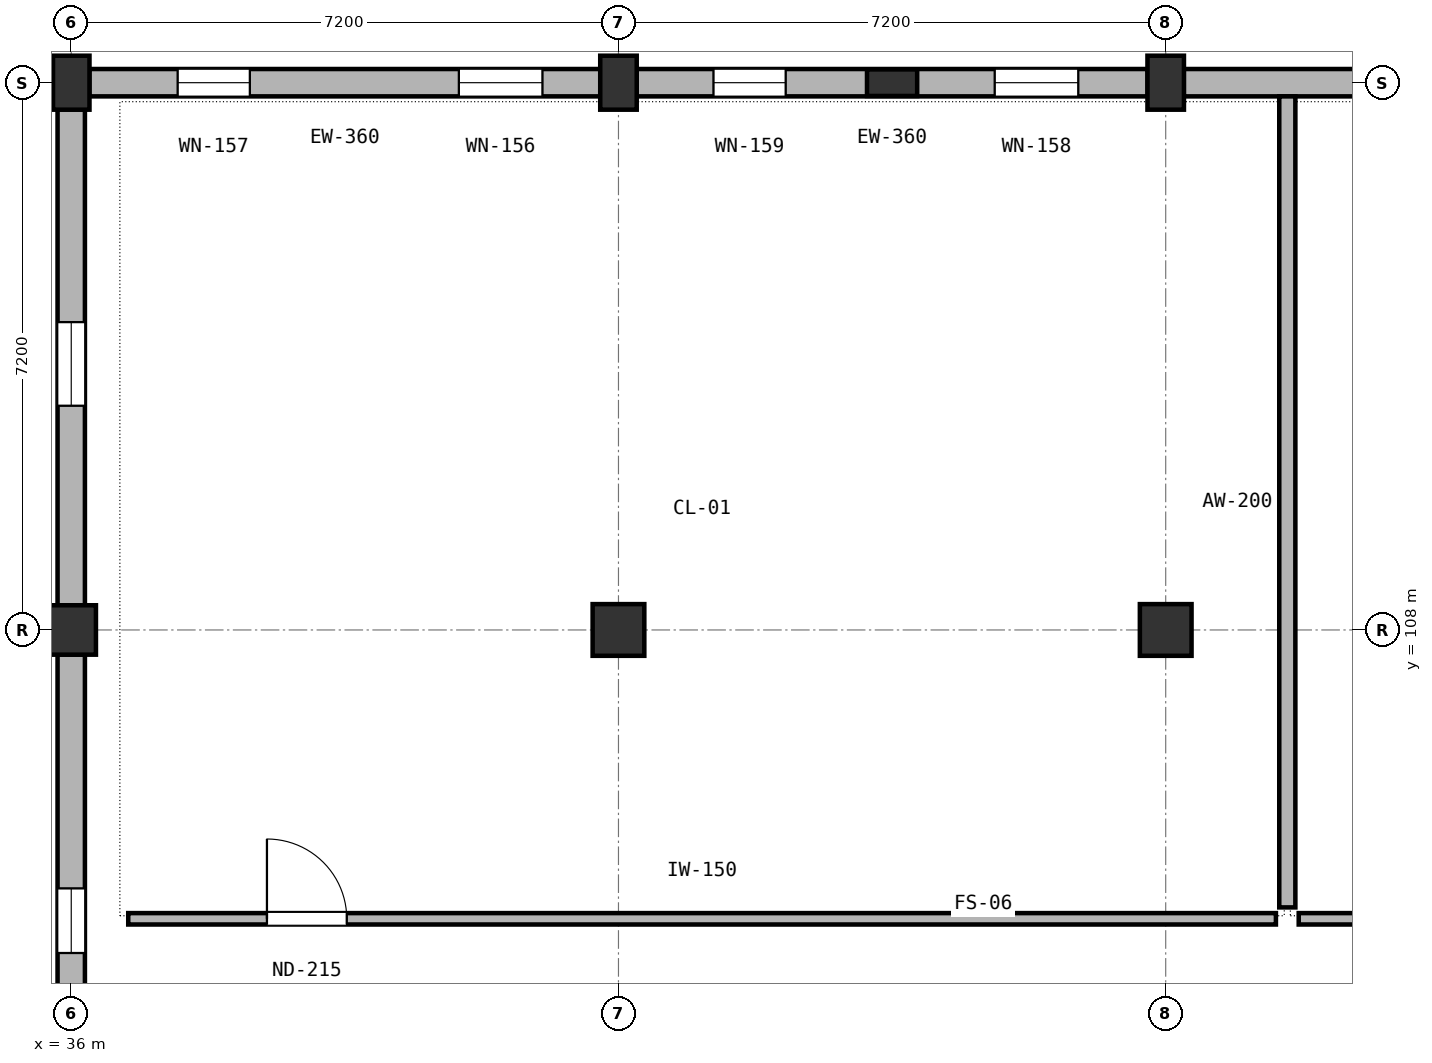
"""IFC4 building model, lengths in metres.
Left out: names, types, materials, properties, quantities, classifications, styles, units other than length and angle.
Written with IfcOpenShell. Run it as: python <this file> out.ifc"""

import sys

from ifc_helpers import new_model, si_unit, direction, frame, frame_2d, origin, origin_2d, place, context, subcontext, project, spatial, rectangle, extrude, element, fill, save


model = new_model("IFC4")
c1 = context("Model", 3, precision=1e-05, world=origin(), true_north=direction((0.0, 1.0)))
c2 = subcontext(c1, "Body", "Model", "MODEL_VIEW")
j1 = project(units=[si_unit("LENGTHUNIT", "METRE"), si_unit("PLANEANGLEUNIT", "RADIAN")], contexts=[c1])
p1 = place(None, origin())
s1 = spatial("IfcSite", under=j1, at=p1, CompositionType="ELEMENT")
p2 = place(p1, origin())
s2 = spatial("IfcBuilding", under=s1, at=p2, CompositionType="ELEMENT")
p3 = place(p2, frame((0.0, 0.0, 22.5)))
s3 = spatial("IfcBuildingStorey", under=s2, at=p3, CompositionType="ELEMENT", Elevation=22.5)
p4 = place(p3, frame((36.0, 108.0, 0.0), z_axis=(0.0, 0.0, 1.0), x_axis=(1.0, 0.0, 0.0)))
e1 = element("IfcColumn", 1, at=p4, inside=s3, PredefinedType="COLUMN", context=c2, shape_type="SweptSolid", body=[
    extrude(rectangle(XDim=0.65, YDim=0.65, at=origin_2d()), origin(), (0.0, 0.0, 1.0), 3.9),
])
p5 = place(p3, frame((36.0, 115.2, 0.0), z_axis=(0.0, 0.0, 1.0), x_axis=(1.0, 0.0, 0.0)))
e2 = element("IfcColumn", 2, at=p5, inside=s3, PredefinedType="COLUMN", context=c2, shape_type="SweptSolid", body=[
    extrude(rectangle(XDim=0.48, YDim=0.71, at=origin_2d()), origin(), (0.0, 0.0, 1.0), 3.9),
])
p6 = place(p3, frame((43.2, 108.0, 0.0), z_axis=(0.0, 0.0, 1.0), x_axis=(1.0, 0.0, 0.0)))
e3 = element("IfcColumn", 3, at=p6, inside=s3, PredefinedType="COLUMN", context=c2, shape_type="SweptSolid", body=[
    extrude(rectangle(XDim=0.68, YDim=0.68, at=origin_2d()), origin(), (0.0, 0.0, 1.0), 3.9),
])
p7 = place(p3, frame((43.2, 115.2, 0.0), z_axis=(0.0, 0.0, 1.0), x_axis=(1.0, 0.0, 0.0)))
e4 = element("IfcColumn", 4, at=p7, inside=s3, PredefinedType="COLUMN", context=c2, shape_type="SweptSolid", body=[
    extrude(rectangle(XDim=0.48, YDim=0.71, at=origin_2d()), origin(), (0.0, 0.0, 1.0), 3.9),
])
p8 = place(p3, frame((50.4, 108.0, 0.0), z_axis=(0.0, 0.0, 1.0), x_axis=(1.0, 0.0, 0.0)))
e5 = element("IfcColumn", 5, at=p8, inside=s3, PredefinedType="COLUMN", context=c2, shape_type="SweptSolid", body=[
    extrude(rectangle(XDim=0.68, YDim=0.68, at=origin_2d()), origin(), (0.0, 0.0, 1.0), 3.9),
])
p9 = place(p3, frame((50.4, 115.2, 0.0), z_axis=(0.0, 0.0, 1.0), x_axis=(1.0, 0.0, 0.0)))
e6 = element("IfcColumn", 6, at=p9, inside=s3, PredefinedType="COLUMN", context=c2, shape_type="SweptSolid", body=[
    extrude(rectangle(XDim=0.48, YDim=0.71, at=origin_2d()), origin(), (0.0, 0.0, 1.0), 3.9),
])
p10 = place(p3, frame((46.8, 115.2, 0.0), z_axis=(0.0, 0.0, 1.0), x_axis=(1.0, 0.0, 0.0)))
e7 = element("IfcColumn", 7, at=p10, inside=s3, PredefinedType="PILASTER", context=c2, shape_type="SweptSolid", body=[
    extrude(rectangle(XDim=0.66, YDim=0.35, at=origin_2d()), origin(), (0.0, 0.0, 1.0), 3.9),
])
p11 = place(p3, frame((42.962, 115.2, 0.0), z_axis=(0.0, 0.0, 1.0), x_axis=(-1.0, 0.0, 0.0)))
e8 = element("IfcWall", 8, at=p11, inside=s3, PredefinedType="SOLIDWALL", context=c2, shape_type="SweptSolid", body=[
    extrude(rectangle(XDim=6.724, YDim=0.36, at=frame_2d((3.362, 0.0))), origin(), (0.0, 0.0, 1.0), 2.74),
])
p12 = place(p11, frame((0.762, 0.0, 0.7)))
e9 = element("IfcOpeningElement", 9, at=p12, cuts=e8, PredefinedType="OPENING", context=c2, shape_type="SweptSolid", body=[
    extrude(rectangle(XDim=1.1, YDim=1.84, at=frame_2d((0.55, 0.92))), frame((0.0, 0.19, 0.0), z_axis=(0.0, -1.0, 0.0), x_axis=(1.0, 0.0, 0.0)), (0.0, 0.0, 1.0), 0.38),
])
p13 = place(p11, frame((4.612, 0.0, 0.7)))
e10 = element("IfcOpeningElement", 10, at=p13, cuts=e8, PredefinedType="OPENING", context=c2, shape_type="SweptSolid", body=[
    extrude(rectangle(XDim=0.95, YDim=1.84, at=frame_2d((0.475, 0.92))), frame((0.0, 0.19, 0.0), z_axis=(0.0, -1.0, 0.0), x_axis=(1.0, 0.0, 0.0)), (0.0, 0.0, 1.0), 0.38),
])
p14 = place(p3, frame((50.162, 115.2, 0.0), z_axis=(0.0, 0.0, 1.0), x_axis=(-1.0, 0.0, 0.0)))
e11 = element("IfcWall", 11, at=p14, inside=s3, PredefinedType="SOLIDWALL", context=c2, shape_type="SweptSolid", body=[
    extrude(rectangle(XDim=6.724, YDim=0.36, at=frame_2d((3.362, 0.0))), origin(), (0.0, 0.0, 1.0), 2.74),
])
p15 = place(p14, frame((0.912, 0.0, 0.7)))
e12 = element("IfcOpeningElement", 12, at=p15, cuts=e11, PredefinedType="OPENING", context=c2, shape_type="SweptSolid", body=[
    extrude(rectangle(XDim=1.1, YDim=1.84, at=frame_2d((0.55, 0.92))), frame((0.0, 0.19, 0.0), z_axis=(0.0, -1.0, 0.0), x_axis=(1.0, 0.0, 0.0)), (0.0, 0.0, 1.0), 0.38),
])
p16 = place(p14, frame((4.762, 0.0, 0.7)))
e13 = element("IfcOpeningElement", 13, at=p16, cuts=e11, PredefinedType="OPENING", context=c2, shape_type="SweptSolid", body=[
    extrude(rectangle(XDim=0.95, YDim=1.84, at=frame_2d((0.475, 0.92))), frame((0.0, 0.19, 0.0), z_axis=(0.0, -1.0, 0.0), x_axis=(1.0, 0.0, 0.0)), (0.0, 0.0, 1.0), 0.38),
])
p17 = place(p3, frame((57.362, 115.2, 0.0), z_axis=(0.0, 0.0, 1.0), x_axis=(-1.0, 0.0, 0.0)))
e14 = element("IfcWall", 14, at=p17, inside=s3, PredefinedType="SOLIDWALL", context=c2, shape_type="SweptSolid", body=[
    extrude(rectangle(XDim=6.724, YDim=0.36, at=frame_2d((3.362, 0.0))), origin(), (0.0, 0.0, 1.0), 2.74),
])
p18 = place(p17, frame((0.762, 0.0, 0.7)))
e15 = element("IfcOpeningElement", 15, at=p18, cuts=e14, PredefinedType="OPENING", context=c2, shape_type="SweptSolid", body=[
    extrude(rectangle(XDim=1.1, YDim=1.84, at=frame_2d((0.55, 0.92))), frame((0.0, 0.19, 0.0), z_axis=(0.0, -1.0, 0.0), x_axis=(1.0, 0.0, 0.0)), (0.0, 0.0, 1.0), 0.38),
])
p19 = place(p17, frame((3.179, 0.0, 0.7)))
e16 = element("IfcOpeningElement", 16, at=p19, cuts=e14, PredefinedType="OPENING", context=c2, shape_type="SweptSolid", body=[
    extrude(rectangle(XDim=0.95, YDim=1.84, at=frame_2d((0.475, 0.92))), frame((0.0, 0.19, 0.0), z_axis=(0.0, -1.0, 0.0), x_axis=(1.0, 0.0, 0.0)), (0.0, 0.0, 1.0), 0.38),
])
p20 = place(p3, frame((36.0, 101.123, 0.0), z_axis=(0.0, 0.0, 1.0), x_axis=(0.0, 1.0, 0.0)))
e17 = element("IfcWall", 17, at=p20, inside=s3, PredefinedType="SOLIDWALL", context=c2, shape_type="SweptSolid", body=[
    extrude(rectangle(XDim=6.554, YDim=0.36, at=frame_2d((3.277, 0.0))), origin(), (0.0, 0.0, 1.0), 2.74),
])
p21 = place(p20, frame((2.627, 0.0, 0.7)))
e18 = element("IfcOpeningElement", 18, at=p21, cuts=e17, PredefinedType="OPENING", context=c2, shape_type="SweptSolid", body=[
    extrude(rectangle(XDim=0.85, YDim=1.89, at=frame_2d((0.425, 0.945))), frame((0.0, 0.19, 0.0), z_axis=(0.0, -1.0, 0.0), x_axis=(1.0, 0.0, 0.0)), (0.0, 0.0, 1.0), 0.38),
])
p22 = place(p3, frame((36.0, 108.323, 0.0), z_axis=(0.0, 0.0, 1.0), x_axis=(0.0, 1.0, 0.0)))
e19 = element("IfcWall", 19, at=p22, inside=s3, PredefinedType="SOLIDWALL", context=c2, shape_type="SweptSolid", body=[
    extrude(rectangle(XDim=6.524, YDim=0.36, at=frame_2d((3.262, 0.0))), origin(), (0.0, 0.0, 1.0), 2.74),
])
p23 = place(p22, frame((2.627, 0.0, 0.7)))
e20 = element("IfcOpeningElement", 20, at=p23, cuts=e19, PredefinedType="OPENING", context=c2, shape_type="SweptSolid", body=[
    extrude(rectangle(XDim=1.1, YDim=1.89, at=frame_2d((0.55, 0.945))), frame((0.0, 0.19, 0.0), z_axis=(0.0, -1.0, 0.0), x_axis=(1.0, 0.0, 0.0)), (0.0, 0.0, 1.0), 0.38),
])
p24 = place(p3, frame((36.75, 104.2, 0.0), z_axis=(0.0, 0.0, 1.0), x_axis=(1.0, 0.0, 0.0)))
e21 = element("IfcWall", 21, at=p24, inside=s3, PredefinedType="PARTITIONING", context=c2, shape_type="SweptSolid", body=[
    extrude(rectangle(XDim=15.1, YDim=0.15, at=frame_2d((7.55, 0.0))), origin(), (0.0, 0.0, 1.0), 2.78),
])
p25 = place(p24, frame((1.825, 0.0, 0.0)))
e22 = element("IfcOpeningElement", 22, at=p25, cuts=e21, PredefinedType="OPENING", context=c2, shape_type="SweptSolid", body=[
    extrude(rectangle(XDim=1.05, YDim=2.15, at=frame_2d((0.525, 1.075))), frame((0.0, 0.085, 0.0), z_axis=(0.0, -1.0, 0.0), x_axis=(1.0, 0.0, 0.0)), (0.0, 0.0, 1.0), 0.17),
])
p26 = place(p3, frame((52.15, 104.2, 0.0), z_axis=(0.0, 0.0, 1.0), x_axis=(1.0, 0.0, 0.0)))
e23 = element("IfcWall", 23, at=p26, inside=s3, PredefinedType="PARTITIONING", context=c2, shape_type="SweptSolid", body=[
    extrude(rectangle(XDim=14.5, YDim=0.15, at=frame_2d((7.25, 0.0))), origin(), (0.0, 0.0, 1.0), 2.78),
])
p27 = place(p26, frame((6.55, 0.0, 0.0)))
e24 = element("IfcOpeningElement", 24, at=p27, cuts=e23, PredefinedType="OPENING", context=c2, shape_type="SweptSolid", body=[
    extrude(rectangle(XDim=1.4, YDim=2.2, at=frame_2d((0.7, 1.1))), frame((0.0, 0.085, 0.0), z_axis=(0.0, -1.0, 0.0), x_axis=(1.0, 0.0, 0.0)), (0.0, 0.0, 1.0), 0.17),
])
p28 = place(p3, frame((52.0, 104.35, 0.0), z_axis=(0.0, 0.0, 1.0), x_axis=(0.0, 1.0, 0.0)))
e25 = element("IfcWall", 25, at=p28, inside=s3, PredefinedType="PARTITIONING", context=c2, shape_type="SweptSolid", body=[
    extrude(rectangle(XDim=10.67, YDim=0.212, at=frame_2d((5.335, 0.0))), origin(), (0.0, 0.0, 1.0), 2.78),
])
p29 = place(p12, origin())
e26 = element("IfcWindow", 26, at=p29, inside=s3, PartitioningType="SINGLE_PANEL", PredefinedType="WINDOW", context=c2, shape_type="SweptSolid", body=[
    extrude(rectangle(XDim=1.1, YDim=1.84, at=frame_2d((0.55, 0.92))), frame((0.0, 0.03, 0.0), z_axis=(0.0, -1.0, 0.0), x_axis=(1.0, 0.0, 0.0)), (0.0, 0.0, 1.0), 0.06),
])
fill(e9, e26)
p30 = place(p13, origin())
e27 = element("IfcWindow", 27, at=p30, inside=s3, PartitioningType="SINGLE_PANEL", PredefinedType="WINDOW", context=c2, shape_type="SweptSolid", body=[
    extrude(rectangle(XDim=0.95, YDim=1.84, at=frame_2d((0.475, 0.92))), frame((0.0, 0.03, 0.0), z_axis=(0.0, -1.0, 0.0), x_axis=(1.0, 0.0, 0.0)), (0.0, 0.0, 1.0), 0.06),
])
fill(e10, e27)
p31 = place(p15, origin())
e28 = element("IfcWindow", 28, at=p31, inside=s3, PartitioningType="SINGLE_PANEL", PredefinedType="WINDOW", context=c2, shape_type="SweptSolid", body=[
    extrude(rectangle(XDim=1.1, YDim=1.84, at=frame_2d((0.55, 0.92))), frame((0.0, 0.03, 0.0), z_axis=(0.0, -1.0, 0.0), x_axis=(1.0, 0.0, 0.0)), (0.0, 0.0, 1.0), 0.06),
])
fill(e12, e28)
p32 = place(p16, origin())
e29 = element("IfcWindow", 29, at=p32, inside=s3, PartitioningType="SINGLE_PANEL", PredefinedType="WINDOW", context=c2, shape_type="SweptSolid", body=[
    extrude(rectangle(XDim=0.95, YDim=1.84, at=frame_2d((0.475, 0.92))), frame((0.0, 0.03, 0.0), z_axis=(0.0, -1.0, 0.0), x_axis=(1.0, 0.0, 0.0)), (0.0, 0.0, 1.0), 0.06),
])
fill(e13, e29)
p33 = place(p21, origin())
e30 = element("IfcWindow", 30, at=p33, inside=s3, PartitioningType="SINGLE_PANEL", PredefinedType="WINDOW", context=c2, shape_type="SweptSolid", body=[
    extrude(rectangle(XDim=0.85, YDim=1.89, at=frame_2d((0.425, 0.945))), frame((0.0, 0.03, 0.0), z_axis=(0.0, -1.0, 0.0), x_axis=(1.0, 0.0, 0.0)), (0.0, 0.0, 1.0), 0.06),
])
fill(e18, e30)
p34 = place(p23, origin())
e31 = element("IfcWindow", 31, at=p34, inside=s3, PartitioningType="SINGLE_PANEL", PredefinedType="WINDOW", context=c2, shape_type="SweptSolid", body=[
    extrude(rectangle(XDim=1.1, YDim=1.89, at=frame_2d((0.55, 0.945))), frame((0.0, 0.03, 0.0), z_axis=(0.0, -1.0, 0.0), x_axis=(1.0, 0.0, 0.0)), (0.0, 0.0, 1.0), 0.06),
])
fill(e20, e31)
p35 = place(p25, origin())
e32 = element("IfcDoor", 32, at=p35, inside=s3, OperationType="SINGLE_SWING_LEFT", PredefinedType="DOOR", context=c2, shape_type="SweptSolid", body=[
    extrude(rectangle(XDim=1.05, YDim=2.15, at=frame_2d((0.525, 1.075))), frame((0.0, 0.025, 0.0), z_axis=(0.0, -1.0, 0.0), x_axis=(1.0, 0.0, 0.0)), (0.0, 0.0, 1.0), 0.05),
])
fill(e22, e32)
save(model, sys.argv[1])
